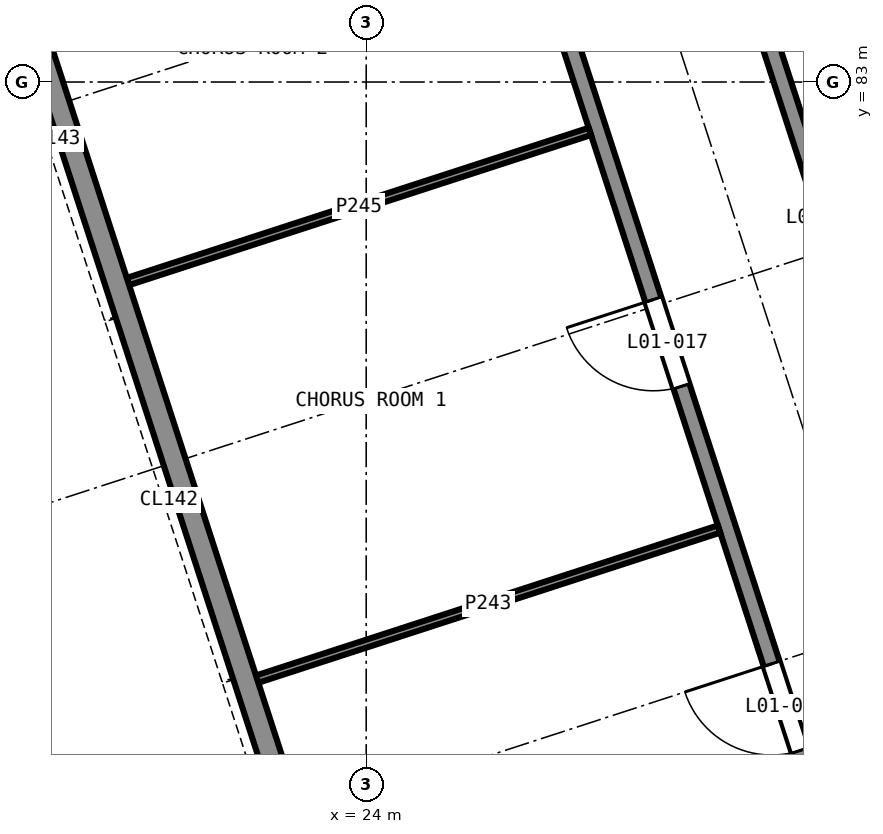
"""IFC4 building model, lengths in metres.
Left out: names, types, materials, properties, quantities, classifications, styles, units other than length and angle.
Written with IfcOpenShell. Run it as: python <this file> out.ifc"""

import sys

from ifc_helpers import new_model, si_unit, direction, frame, frame_2d, origin, place, context, subcontext, project, spatial, rectangle, extrude, element, fill, save


model = new_model("IFC4")
c1 = context("Model", 3, precision=1e-05, world=origin(), true_north=direction((0.0, 1.0)))
c2 = subcontext(c1, "Body", "Model", "MODEL_VIEW")
j1 = project(units=[si_unit("LENGTHUNIT", "METRE"), si_unit("PLANEANGLEUNIT", "RADIAN")], contexts=[c1])
p1 = place(None, origin())
s1 = spatial("IfcSite", under=j1, at=p1, CompositionType="ELEMENT")
p2 = place(p1, origin())
s2 = spatial("IfcBuilding", under=s1, at=p2, CompositionType="ELEMENT")
p3 = place(p2, frame((0.0, 0.0, 5.5)))
s3 = spatial("IfcBuildingStorey", under=s2, at=p3, CompositionType="ELEMENT", Elevation=5.5)
p4 = place(p3, frame((33.501, 41.003, 0.0), z_axis=(0.0, 0.0, 1.0), x_axis=(-0.309017194826, 0.951056451165, 0.0)))
e1 = element("IfcWall", 1, at=p4, inside=s3, PredefinedType="SOLIDWALL", context=c2, shape_type="SweptSolid", body=[
    extrude(rectangle(XDim=53.7, YDim=0.3, at=frame_2d((26.85, 0.0))), origin(), (0.0, 0.0, 1.0), 4.0),
])
p5 = place(p4, frame((26.55, 0.0, 0.9)))
e2 = element("IfcOpeningElement", 2, at=p5, cuts=e1, PredefinedType="OPENING", context=c2, shape_type="SweptSolid", body=[
    extrude(rectangle(XDim=3.6, YDim=2.1, at=frame_2d((1.8, 1.05))), frame((0.0, 0.16, 0.0), z_axis=(0.0, -1.0, 0.0), x_axis=(1.0, 0.0, 0.0)), (0.0, 0.0, 1.0), 0.32),
])
p6 = place(p3, frame((37.956, 48.812, 0.0), z_axis=(0.0, 0.0, 1.0), x_axis=(-0.30901736393, 0.951056396219, 0.0)))
e3 = element("IfcWall", 3, at=p6, inside=s3, PredefinedType="SOLIDWALL", context=c2, shape_type="SweptSolid", body=[
    extrude(rectangle(XDim=41.7, YDim=0.22, at=frame_2d((20.85, 0.0))), origin(), (0.0, 0.0, 1.0), 3.7),
])
p7 = place(p6, frame((2.009, 0.0, 0.0)))
e4 = element("IfcOpeningElement", 4, at=p7, cuts=e3, PredefinedType="OPENING", context=c2, shape_type="SweptSolid", body=[
    extrude(rectangle(XDim=1.0, YDim=2.1, at=frame_2d((0.5, 1.05))), frame((0.0, 0.12, 0.0), z_axis=(0.0, -1.0, 0.0), x_axis=(1.0, 0.0, 0.0)), (0.0, 0.0, 1.0), 0.24),
])
p8 = place(p6, frame((6.6, 0.0, 0.0)))
e5 = element("IfcOpeningElement", 5, at=p8, cuts=e3, PredefinedType="OPENING", context=c2, shape_type="SweptSolid", body=[
    extrude(rectangle(XDim=1.2, YDim=2.1, at=frame_2d((0.6, 1.05))), frame((0.0, 0.12, 0.0), z_axis=(0.0, -1.0, 0.0), x_axis=(1.0, 0.0, 0.0)), (0.0, 0.0, 1.0), 0.24),
])
p9 = place(p6, frame((11.7, 0.0, 0.0)))
e6 = element("IfcOpeningElement", 6, at=p9, cuts=e3, PredefinedType="OPENING", context=c2, shape_type="SweptSolid", body=[
    extrude(rectangle(XDim=1.2, YDim=2.1, at=frame_2d((0.6, 1.05))), frame((0.0, 0.12, 0.0), z_axis=(0.0, -1.0, 0.0), x_axis=(1.0, 0.0, 0.0)), (0.0, 0.0, 1.0), 0.24),
])
p10 = place(p6, frame((16.7, 0.0, 0.0)))
e7 = element("IfcOpeningElement", 7, at=p10, cuts=e3, PredefinedType="OPENING", context=c2, shape_type="SweptSolid", body=[
    extrude(rectangle(XDim=1.2, YDim=2.1, at=frame_2d((0.6, 1.05))), frame((0.0, 0.12, 0.0), z_axis=(0.0, -1.0, 0.0), x_axis=(1.0, 0.0, 0.0)), (0.0, 0.0, 1.0), 0.24),
])
p11 = place(p6, frame((21.7, 0.0, 0.0)))
e8 = element("IfcOpeningElement", 8, at=p11, cuts=e3, PredefinedType="OPENING", context=c2, shape_type="SweptSolid", body=[
    extrude(rectangle(XDim=1.2, YDim=2.1, at=frame_2d((0.6, 1.05))), frame((0.0, 0.12, 0.0), z_axis=(0.0, -1.0, 0.0), x_axis=(1.0, 0.0, 0.0)), (0.0, 0.0, 1.0), 0.24),
])
p12 = place(p6, frame((26.7, 0.0, 0.0)))
e9 = element("IfcOpeningElement", 9, at=p12, cuts=e3, PredefinedType="OPENING", context=c2, shape_type="SweptSolid", body=[
    extrude(rectangle(XDim=1.2, YDim=2.1, at=frame_2d((0.6, 1.05))), frame((0.0, 0.12, 0.0), z_axis=(0.0, -1.0, 0.0), x_axis=(1.0, 0.0, 0.0)), (0.0, 0.0, 1.0), 0.24),
])
p13 = place(p6, frame((31.739, 0.0, 0.0)))
e10 = element("IfcOpeningElement", 10, at=p13, cuts=e3, PredefinedType="OPENING", context=c2, shape_type="SweptSolid", body=[
    extrude(rectangle(XDim=1.2, YDim=2.1, at=frame_2d((0.6, 1.05))), frame((0.0, 0.12, 0.0), z_axis=(0.0, -1.0, 0.0), x_axis=(1.0, 0.0, 0.0)), (0.0, 0.0, 1.0), 0.24),
])
p14 = place(p3, frame((40.333, 49.584, 0.0), z_axis=(0.0, 0.0, 1.0), x_axis=(-0.309015643281, 0.951056955291, 0.0)))
e11 = element("IfcWall", 11, at=p14, inside=s3, PredefinedType="SOLIDWALL", context=c2, shape_type="SweptSolid", body=[
    extrude(rectangle(XDim=41.7, YDim=0.22, at=frame_2d((20.85, 0.0))), origin(), (0.0, 0.0, 1.0), 3.7),
])
p15 = place(p14, frame((1.9, 0.0, 0.0)))
e12 = element("IfcOpeningElement", 12, at=p15, cuts=e11, PredefinedType="OPENING", context=c2, shape_type="SweptSolid", body=[
    extrude(rectangle(XDim=1.2, YDim=2.1, at=frame_2d((0.6, 1.05))), frame((0.0, 0.12, 0.0), z_axis=(0.0, -1.0, 0.0), x_axis=(1.0, 0.0, 0.0)), (0.0, 0.0, 1.0), 0.24),
])
p16 = place(p14, frame((8.285, 0.0, 0.0)))
e13 = element("IfcOpeningElement", 13, at=p16, cuts=e11, PredefinedType="OPENING", context=c2, shape_type="SweptSolid", body=[
    extrude(rectangle(XDim=1.0, YDim=2.1, at=frame_2d((0.5, 1.05))), frame((0.0, 0.12, 0.0), z_axis=(0.0, -1.0, 0.0), x_axis=(1.0, 0.0, 0.0)), (0.0, 0.0, 1.0), 0.24),
])
p17 = place(p14, frame((16.375, 0.0, 0.0)))
e14 = element("IfcOpeningElement", 14, at=p17, cuts=e11, PredefinedType="OPENING", context=c2, shape_type="SweptSolid", body=[
    extrude(rectangle(XDim=1.2, YDim=2.1, at=frame_2d((0.6, 1.05))), frame((0.0, 0.12, 0.0), z_axis=(0.0, -1.0, 0.0), x_axis=(1.0, 0.0, 0.0)), (0.0, 0.0, 1.0), 0.24),
])
p18 = place(p14, frame((25.752, 0.0, 0.0)))
e15 = element("IfcOpeningElement", 15, at=p18, cuts=e11, PredefinedType="OPENING", context=c2, shape_type="SweptSolid", body=[
    extrude(rectangle(XDim=1.0, YDim=2.1, at=frame_2d((0.5, 1.05))), frame((0.0, 0.12, 0.0), z_axis=(0.0, -1.0, 0.0), x_axis=(1.0, 0.0, 0.0)), (0.0, 0.0, 1.0), 0.24),
])
p19 = place(p14, frame((32.761, 0.0, 0.0)))
e16 = element("IfcOpeningElement", 16, at=p19, cuts=e11, PredefinedType="OPENING", context=c2, shape_type="SweptSolid", body=[
    extrude(rectangle(XDim=1.0, YDim=2.1, at=frame_2d((0.5, 1.05))), frame((0.0, 0.12, 0.0), z_axis=(0.0, -1.0, 0.0), x_axis=(1.0, 0.0, 0.0)), (0.0, 0.0, 1.0), 0.24),
])
for number, where, z_axis, x_axis in (
    (17, (22.565, 75.144, 0.0), (0.0, 0.0, 1.0), (0.951, 0.309, 0.0)),
    (18, (20.865, 80.375, 0.0), (0.0, 0.0, 1.0), (0.951, 0.309, 0.0)),
):
    element("IfcWall", number, at=place(p3, frame(where, z_axis=z_axis, x_axis=x_axis)), inside=s3, PredefinedType="PARTITIONING", context=c2, shape_type="SweptSolid", body=[
        extrude(rectangle(XDim=6.39, YDim=0.1, at=frame_2d((3.195, 0.0))), origin(), (0.0, 0.0, 1.0), 3.7),
    ])
p20 = place(p12, origin())
e19 = element("IfcDoor", 19, at=p20, inside=s3, OperationType="SINGLE_SWING_LEFT", PredefinedType="DOOR", context=c2, shape_type="SweptSolid", body=[
    extrude(rectangle(XDim=1.2, YDim=2.1, at=frame_2d((0.6, 1.05))), frame((0.0, 0.025, 0.0), z_axis=(0.0, -1.0, 0.0), x_axis=(1.0, 0.0, 0.0)), (0.0, 0.0, 1.0), 0.05),
])
fill(e9, e19)
p21 = place(p13, origin())
e20 = element("IfcDoor", 20, at=p21, inside=s3, OperationType="SINGLE_SWING_LEFT", PredefinedType="DOOR", context=c2, shape_type="SweptSolid", body=[
    extrude(rectangle(XDim=1.2, YDim=2.1, at=frame_2d((0.6, 1.05))), frame((0.0, 0.025, 0.0), z_axis=(0.0, -1.0, 0.0), x_axis=(1.0, 0.0, 0.0)), (0.0, 0.0, 1.0), 0.05),
])
fill(e10, e20)
save(model, sys.argv[1])
